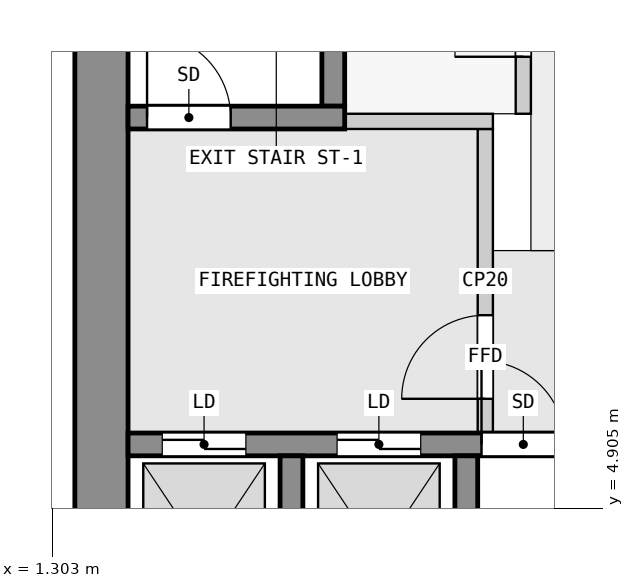
"""IFC4 building model, lengths in metres.
Left out: names, types, materials, properties, quantities, classifications, styles, units other than length and angle.
Written with IfcOpenShell. Run it as: python <this file> out.ifc"""

import sys

from ifc_helpers import new_model, si_unit, direction, frame, frame_2d, origin, place, context, subcontext, project, spatial, rectangle, extrude, element, fill, save


model = new_model("IFC4")
c1 = context("Model", 3, precision=1e-05, world=origin(), true_north=direction((0.0, 1.0)))
c2 = subcontext(c1, "Body", "Model", "MODEL_VIEW")
j1 = project(units=[si_unit("LENGTHUNIT", "METRE"), si_unit("PLANEANGLEUNIT", "RADIAN")], contexts=[c1])
p1 = place(None, origin())
s1 = spatial("IfcSite", under=j1, at=p1, CompositionType="ELEMENT")
p2 = place(p1, origin())
s2 = spatial("IfcBuilding", under=s1, at=p2, CompositionType="ELEMENT")
p3 = place(p2, frame((0.0, 0.0, 88.8)))
s3 = spatial("IfcBuildingStorey", under=s2, at=p3, CompositionType="ELEMENT", Elevation=88.8)
p4 = place(p3, frame((1.95, 2.5, 0.0), z_axis=(0.0, 0.0, 1.0), x_axis=(0.0, 1.0, 0.0)))
e1 = element("IfcWall", 1, at=p4, inside=s3, PredefinedType="SHEAR", context=c2, shape_type="SweptSolid", body=[
    extrude(rectangle(XDim=14.8, YDim=0.7, at=frame_2d((7.4, 0.0))), origin(), (0.0, 0.0, 1.0), 3.25),
])
for number, where, z_axis, x_axis in (
    (2, (4.45, 2.8, 0.0), (0.0, 0.0, 1.0), (0.0, 1.0, 0.0)),
    (3, (6.75, 2.8, 0.0), (0.0, 0.0, 1.0), (0.0, 1.0, 0.0)),
):
    element("IfcWall", number, at=place(p3, frame(where, z_axis=z_axis, x_axis=x_axis)), inside=s3, PredefinedType="SHEAR", context=c2, shape_type="SweptSolid", body=[
        extrude(rectangle(XDim=2.8, YDim=0.3, at=frame_2d((1.4, 0.0))), origin(), (0.0, 0.0, 1.0), 3.25),
    ])
p5 = place(p3, frame((2.3, 5.75, 0.0), z_axis=(0.0, 0.0, 1.0), x_axis=(1.0, 0.0, 0.0)))
e4 = element("IfcWall", 4, at=p5, inside=s3, PredefinedType="SHEAR", context=c2, shape_type="SweptSolid", body=[
    extrude(rectangle(XDim=18.8, YDim=0.3, at=frame_2d((9.4, 0.0))), origin(), (0.0, 0.0, 1.0), 3.25),
])
p6 = place(p5, frame((4.65, 0.0, 0.0)))
e5 = element("IfcOpeningElement", 5, at=p6, cuts=e4, PredefinedType="OPENING", context=c2, shape_type="SweptSolid", body=[
    extrude(rectangle(XDim=1.1, YDim=2.1, at=frame_2d((0.55, 1.05))), frame((0.0, 0.16, 0.0), z_axis=(0.0, -1.0, 0.0), x_axis=(1.0, 0.0, 0.0)), (0.0, 0.0, 1.0), 0.32),
])
p7 = place(p5, frame((0.45, 0.0, 0.0)))
e6 = element("IfcOpeningElement", 6, at=p7, cuts=e4, PredefinedType="OPENING", context=c2, shape_type="SweptSolid", body=[
    extrude(rectangle(XDim=1.1, YDim=2.1, at=frame_2d((0.55, 1.05))), frame((0.0, 0.16, 0.0), z_axis=(0.0, -1.0, 0.0), x_axis=(1.0, 0.0, 0.0)), (0.0, 0.0, 1.0), 0.32),
])
p8 = place(p5, frame((2.75, 0.0, 0.0)))
e7 = element("IfcOpeningElement", 7, at=p8, cuts=e4, PredefinedType="OPENING", context=c2, shape_type="SweptSolid", body=[
    extrude(rectangle(XDim=1.1, YDim=2.1, at=frame_2d((0.55, 1.05))), frame((0.0, 0.16, 0.0), z_axis=(0.0, -1.0, 0.0), x_axis=(1.0, 0.0, 0.0)), (0.0, 0.0, 1.0), 0.32),
])
p9 = place(p5, frame((11.85, 0.0, 0.0)))
e8 = element("IfcOpeningElement", 8, at=p9, cuts=e4, PredefinedType="OPENING", context=c2, shape_type="SweptSolid", body=[
    extrude(rectangle(XDim=1.1, YDim=2.1, at=frame_2d((0.55, 1.05))), frame((0.0, 0.16, 0.0), z_axis=(0.0, -1.0, 0.0), x_axis=(1.0, 0.0, 0.0)), (0.0, 0.0, 1.0), 0.32),
])
p10 = place(p5, frame((14.35, 0.0, 0.0)))
e9 = element("IfcOpeningElement", 9, at=p10, cuts=e4, PredefinedType="OPENING", context=c2, shape_type="SweptSolid", body=[
    extrude(rectangle(XDim=1.1, YDim=2.1, at=frame_2d((0.55, 1.05))), frame((0.0, 0.16, 0.0), z_axis=(0.0, -1.0, 0.0), x_axis=(1.0, 0.0, 0.0)), (0.0, 0.0, 1.0), 0.32),
])
p11 = place(p5, frame((16.85, 0.0, 0.0)))
e10 = element("IfcOpeningElement", 10, at=p11, cuts=e4, PredefinedType="OPENING", context=c2, shape_type="SweptSolid", body=[
    extrude(rectangle(XDim=1.1, YDim=2.1, at=frame_2d((0.55, 1.05))), frame((0.0, 0.16, 0.0), z_axis=(0.0, -1.0, 0.0), x_axis=(1.0, 0.0, 0.0)), (0.0, 0.0, 1.0), 0.32),
])
p12 = place(p3, frame((2.3, 10.05, 0.0), z_axis=(0.0, 0.0, 1.0), x_axis=(1.0, 0.0, 0.0)))
e11 = element("IfcWall", 11, at=p12, inside=s3, PredefinedType="SHEAR", context=c2, shape_type="SweptSolid", body=[
    extrude(rectangle(XDim=2.85, YDim=0.3, at=frame_2d((1.425, 0.0))), origin(), (0.0, 0.0, 1.0), 3.25),
])
p13 = place(p12, frame((0.25, 0.0, 0.0)))
e12 = element("IfcOpeningElement", 12, at=p13, cuts=e11, PredefinedType="OPENING", context=c2, shape_type="SweptSolid", body=[
    extrude(rectangle(XDim=1.1, YDim=2.1, at=frame_2d((0.55, 1.05))), frame((0.0, 0.16, 0.0), z_axis=(0.0, -1.0, 0.0), x_axis=(1.0, 0.0, 0.0)), (0.0, 0.0, 1.0), 0.32),
])
p14 = place(p3, frame((5.0, 10.2, 0.0), z_axis=(0.0, 0.0, 1.0), x_axis=(0.0, 1.0, 0.0)))
e13 = element("IfcWall", 13, at=p14, inside=s3, PredefinedType="SHEAR", context=c2, shape_type="SweptSolid", body=[
    extrude(rectangle(XDim=6.4, YDim=0.3, at=frame_2d((3.2, 0.0))), origin(), (0.0, 0.0, 1.0), 3.25),
])
p15 = place(p3, frame((7.0, 5.9, 0.0), z_axis=(0.0, 0.0, 1.0), x_axis=(0.0, 1.0, 0.0)))
e14 = element("IfcWall", 14, at=p15, inside=s3, PredefinedType="PARTITIONING", context=c2, shape_type="SweptSolid", body=[
    extrude(rectangle(XDim=4.0, YDim=0.2, at=frame_2d((2.0, 0.0))), origin(), (0.0, 0.0, 1.0), 3.25),
])
p16 = place(p15, frame((0.45, 0.0, 0.0)))
e15 = element("IfcOpeningElement", 15, at=p16, cuts=e14, PredefinedType="OPENING", context=c2, shape_type="SweptSolid", body=[
    extrude(rectangle(XDim=1.1, YDim=2.1, at=frame_2d((0.55, 1.05))), frame((0.0, 0.11, 0.0), z_axis=(0.0, -1.0, 0.0), x_axis=(1.0, 0.0, 0.0)), (0.0, 0.0, 1.0), 0.22),
])
p17 = place(p3, frame((5.15, 10.0, 0.0), z_axis=(0.0, 0.0, 1.0), x_axis=(1.0, 0.0, 0.0)))
e16 = element("IfcWall", 16, at=p17, inside=s3, PredefinedType="PARTITIONING", context=c2, shape_type="SweptSolid", body=[
    extrude(rectangle(XDim=1.95, YDim=0.2, at=frame_2d((0.975, 0.0))), origin(), (0.0, 0.0, 1.0), 3.25),
])
p18 = place(p3, frame((7.5, 10.1, 0.0), z_axis=(0.0, 0.0, 1.0), x_axis=(0.0, 1.0, 0.0)))
e17 = element("IfcWall", 17, at=p18, inside=s3, PredefinedType="PARTITIONING", context=c2, shape_type="SweptSolid", body=[
    extrude(rectangle(XDim=7.2, YDim=0.2, at=frame_2d((3.6, 0.0))), origin(), (0.0, 0.0, 1.0), 3.25),
])
p19 = place(p18, frame((0.75, 0.0, 0.0)))
e18 = element("IfcOpeningElement", 18, at=p19, cuts=e17, PredefinedType="OPENING", context=c2, shape_type="SweptSolid", body=[
    extrude(rectangle(XDim=0.9, YDim=2.1, at=frame_2d((0.45, 1.05))), frame((0.0, 0.11, 0.0), z_axis=(0.0, -1.0, 0.0), x_axis=(1.0, 0.0, 0.0)), (0.0, 0.0, 1.0), 0.22),
])
p20 = place(p18, frame((3.175, 0.0, 0.0)))
e19 = element("IfcOpeningElement", 19, at=p20, cuts=e17, PredefinedType="OPENING", context=c2, shape_type="SweptSolid", body=[
    extrude(rectangle(XDim=0.9, YDim=2.1, at=frame_2d((0.45, 1.05))), frame((0.0, 0.11, 0.0), z_axis=(0.0, -1.0, 0.0), x_axis=(1.0, 0.0, 0.0)), (0.0, 0.0, 1.0), 0.22),
])
p21 = place(p18, frame((5.25, 0.0, 0.0)))
e20 = element("IfcOpeningElement", 20, at=p21, cuts=e17, PredefinedType="OPENING", context=c2, shape_type="SweptSolid", body=[
    extrude(rectangle(XDim=0.9, YDim=2.1, at=frame_2d((0.45, 1.05))), frame((0.0, 0.11, 0.0), z_axis=(0.0, -1.0, 0.0), x_axis=(1.0, 0.0, 0.0)), (0.0, 0.0, 1.0), 0.22),
])
p22 = place(p16, origin())
e21 = element("IfcDoor", 21, at=p22, inside=s3, OperationType="SINGLE_SWING_LEFT", PredefinedType="DOOR", context=c2, shape_type="SweptSolid", body=[
    extrude(rectangle(XDim=1.1, YDim=2.1, at=frame_2d((0.55, 1.05))), frame((0.0, 0.025, 0.0), z_axis=(0.0, -1.0, 0.0), x_axis=(1.0, 0.0, 0.0)), (0.0, 0.0, 1.0), 0.05),
])
fill(e15, e21)
p23 = place(p13, origin())
e22 = element("IfcDoor", 22, at=p23, inside=s3, OperationType="SINGLE_SWING_RIGHT", PredefinedType="DOOR", context=c2, shape_type="SweptSolid", body=[
    extrude(rectangle(XDim=1.1, YDim=2.1, at=frame_2d((0.55, 1.05))), frame((0.0, 0.025, 0.0), z_axis=(0.0, -1.0, 0.0), x_axis=(1.0, 0.0, 0.0)), (0.0, 0.0, 1.0), 0.05),
])
fill(e12, e22)
p24 = place(p6, origin())
e23 = element("IfcDoor", 23, at=p24, inside=s3, OperationType="SINGLE_SWING_LEFT", PredefinedType="DOOR", context=c2, shape_type="SweptSolid", body=[
    extrude(rectangle(XDim=1.1, YDim=2.1, at=frame_2d((0.55, 1.05))), frame((0.0, 0.025, 0.0), z_axis=(0.0, -1.0, 0.0), x_axis=(1.0, 0.0, 0.0)), (0.0, 0.0, 1.0), 0.05),
])
fill(e5, e23)
p25 = place(p7, origin())
e24 = element("IfcDoor", 24, at=p25, inside=s3, OperationType="DOUBLE_DOOR_SLIDING", PredefinedType="DOOR", context=c2, shape_type="SweptSolid", body=[
    extrude(rectangle(XDim=1.1, YDim=2.1, at=frame_2d((0.55, 1.05))), frame((0.0, 0.025, 0.0), z_axis=(0.0, -1.0, 0.0), x_axis=(1.0, 0.0, 0.0)), (0.0, 0.0, 1.0), 0.05),
])
fill(e6, e24)
p26 = place(p8, origin())
e25 = element("IfcDoor", 25, at=p26, inside=s3, OperationType="DOUBLE_DOOR_SLIDING", PredefinedType="DOOR", context=c2, shape_type="SweptSolid", body=[
    extrude(rectangle(XDim=1.1, YDim=2.1, at=frame_2d((0.55, 1.05))), frame((0.0, 0.025, 0.0), z_axis=(0.0, -1.0, 0.0), x_axis=(1.0, 0.0, 0.0)), (0.0, 0.0, 1.0), 0.05),
])
fill(e7, e25)
p27 = place(p19, origin())
e26 = element("IfcDoor", 26, at=p27, inside=s3, OperationType="SINGLE_SWING_RIGHT", PredefinedType="DOOR", context=c2, shape_type="SweptSolid", body=[
    extrude(rectangle(XDim=0.9, YDim=2.1, at=frame_2d((0.45, 1.05))), frame((0.0, 0.025, 0.0), z_axis=(0.0, -1.0, 0.0), x_axis=(1.0, 0.0, 0.0)), (0.0, 0.0, 1.0), 0.05),
])
fill(e18, e26)
save(model, sys.argv[1])
